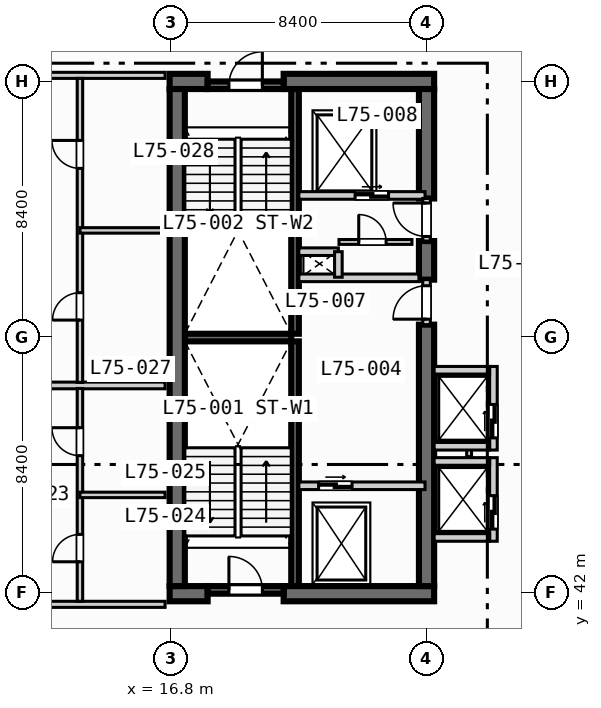
"""IFC4 building model, lengths in metres.
Left out: names, types, materials, properties, quantities, classifications, styles, units other than length and angle.
Written with IfcOpenShell. Run it as: python <this file> out.ifc"""

import sys

from ifc_helpers import new_model, si_unit, direction, frame, frame_2d, origin, place, context, subcontext, project, spatial, rectangle, extrude, element, fill, save


model = new_model("IFC4")
c1 = context("Model", 3, precision=1e-05, world=origin(), true_north=direction((0.0, 1.0)))
c2 = subcontext(c1, "Body", "Model", "MODEL_VIEW")
j1 = project(units=[si_unit("LENGTHUNIT", "METRE"), si_unit("PLANEANGLEUNIT", "RADIAN")], contexts=[c1])
p1 = place(None, origin())
s1 = spatial("IfcSite", under=j1, at=p1, CompositionType="ELEMENT")
p2 = place(p1, origin())
s2 = spatial("IfcBuilding", under=s1, at=p2, CompositionType="ELEMENT")
p3 = place(p2, frame((0.0, 0.0, 304.7)))
s3 = spatial("IfcBuildingStorey", under=s2, at=p3, CompositionType="ELEMENT", Elevation=304.7)
for number, where, z_axis, x_axis in (
    (1, (20.875, 42.2, 0.0), (0.0, 0.0, 1.0), (0.0, 1.0, 0.0)),
    (2, (20.875, 50.5, 0.0), (0.0, 0.0, 1.0), (0.0, 1.0, 0.0)),
):
    element("IfcWall", number, at=place(p3, frame(where, z_axis=z_axis, x_axis=x_axis)), inside=s3, PredefinedType="SOLIDWALL", context=c2, shape_type="SweptSolid", body=[
        extrude(rectangle(XDim=8.05, YDim=0.25, at=frame_2d((4.025, 0.0))), origin(), (0.0, 0.0, 1.0), 3.67),
    ])
p4 = place(p3, frame((17.25, 50.375, 0.0), z_axis=(0.0, 0.0, 1.0), x_axis=(1.0, 0.0, 0.0)))
e3 = element("IfcWall", 3, at=p4, inside=s3, PredefinedType="SOLIDWALL", context=c2, shape_type="SweptSolid", body=[
    extrude(rectangle(XDim=3.5, YDim=0.25, at=frame_2d((1.75, 0.0))), origin(), (0.0, 0.0, 1.0), 3.67),
])
p5 = place(p3, frame((16.75, 41.95, 0.0), z_axis=(0.0, 0.0, 1.0), x_axis=(1.0, 0.0, 0.0)))
e4 = element("IfcWall", 4, at=p5, inside=s3, PredefinedType="SHEAR", context=c2, shape_type="SweptSolid", body=[
    extrude(rectangle(XDim=1.25, YDim=0.5, at=frame_2d((0.625, 0.0))), origin(), (0.0, 0.0, 1.0), 3.67),
])
p6 = place(p3, frame((20.5, 41.95, 0.0), z_axis=(0.0, 0.0, 1.0), x_axis=(1.0, 0.0, 0.0)))
e5 = element("IfcWall", 5, at=p6, inside=s3, PredefinedType="SHEAR", context=c2, shape_type="SweptSolid", body=[
    extrude(rectangle(XDim=4.95, YDim=0.5, at=frame_2d((2.475, 0.0))), origin(), (0.0, 0.0, 1.0), 3.67),
])
p7 = place(p3, frame((16.75, 58.8, 0.0), z_axis=(0.0, 0.0, 1.0), x_axis=(1.0, 0.0, 0.0)))
e6 = element("IfcWall", 6, at=p7, inside=s3, PredefinedType="SHEAR", context=c2, shape_type="SweptSolid", body=[
    extrude(rectangle(XDim=1.25, YDim=0.5, at=frame_2d((0.625, 0.0))), origin(), (0.0, 0.0, 1.0), 3.67),
])
p8 = place(p3, frame((20.5, 58.8, 0.0), z_axis=(0.0, 0.0, 1.0), x_axis=(1.0, 0.0, 0.0)))
e7 = element("IfcWall", 7, at=p8, inside=s3, PredefinedType="SHEAR", context=c2, shape_type="SweptSolid", body=[
    extrude(rectangle(XDim=4.95, YDim=0.5, at=frame_2d((2.475, 0.0))), origin(), (0.0, 0.0, 1.0), 3.67),
])
p9 = place(p3, frame((17.0, 42.2, 0.0), z_axis=(0.0, 0.0, 1.0), x_axis=(0.0, 1.0, 0.0)))
e8 = element("IfcWall", 8, at=p9, inside=s3, PredefinedType="SHEAR", context=c2, shape_type="SweptSolid", body=[
    extrude(rectangle(XDim=16.35, YDim=0.5, at=frame_2d((8.175, 0.0))), origin(), (0.0, 0.0, 1.0), 3.67),
])
p10 = place(p3, frame((25.2, 42.2, 0.0), z_axis=(0.0, 0.0, 1.0), x_axis=(0.0, 1.0, 0.0)))
e9 = element("IfcWall", 9, at=p10, inside=s3, PredefinedType="SHEAR", context=c2, shape_type="SweptSolid", body=[
    extrude(rectangle(XDim=8.6, YDim=0.5, at=frame_2d((4.3, 0.0))), origin(), (0.0, 0.0, 1.0), 3.67),
])
p11 = place(p3, frame((25.2, 52.28, 0.0), z_axis=(0.0, 0.0, 1.0), x_axis=(0.0, 1.0, 0.0)))
e10 = element("IfcWall", 10, at=p11, inside=s3, PredefinedType="SHEAR", context=c2, shape_type="SweptSolid", body=[
    extrude(rectangle(XDim=1.27, YDim=0.5, at=frame_2d((0.635, 0.0))), origin(), (0.0, 0.0, 1.0), 3.67),
])
p12 = place(p3, frame((25.2, 54.95, 0.0), z_axis=(0.0, 0.0, 1.0), x_axis=(0.0, 1.0, 0.0)))
e11 = element("IfcWall", 11, at=p12, inside=s3, PredefinedType="SHEAR", context=c2, shape_type="SweptSolid", body=[
    extrude(rectangle(XDim=3.6, YDim=0.5, at=frame_2d((1.8, 0.0))), origin(), (0.0, 0.0, 1.0), 3.67),
])
p13 = place(p3, frame((18.0, 42.075, 0.0), z_axis=(0.0, 0.0, 1.0), x_axis=(1.0, 0.0, 0.0)))
e12 = element("IfcWall", 12, at=p13, inside=s3, PredefinedType="SOLIDWALL", context=c2, shape_type="SweptSolid", body=[
    extrude(rectangle(XDim=2.5, YDim=0.25, at=frame_2d((1.25, 0.0))), origin(), (0.0, 0.0, 1.0), 3.67),
])
p14 = place(p13, frame((0.7, 0.0, 0.0)))
e13 = element("IfcOpeningElement", 13, at=p14, cuts=e12, PredefinedType="OPENING", context=c2, shape_type="SweptSolid", body=[
    extrude(rectangle(XDim=1.1, YDim=2.15, at=frame_2d((0.55, 1.075))), frame((0.0, 0.135, 0.0), z_axis=(0.0, -1.0, 0.0), x_axis=(1.0, 0.0, 0.0)), (0.0, 0.0, 1.0), 0.27),
])
p15 = place(p3, frame((18.0, 58.675, 0.0), z_axis=(0.0, 0.0, 1.0), x_axis=(1.0, 0.0, 0.0)))
e14 = element("IfcWall", 14, at=p15, inside=s3, PredefinedType="SOLIDWALL", context=c2, shape_type="SweptSolid", body=[
    extrude(rectangle(XDim=2.5, YDim=0.25, at=frame_2d((1.25, 0.0))), origin(), (0.0, 0.0, 1.0), 3.67),
])
p16 = place(p15, frame((0.7, 0.0, 0.0)))
e15 = element("IfcOpeningElement", 15, at=p16, cuts=e14, PredefinedType="OPENING", context=c2, shape_type="SweptSolid", body=[
    extrude(rectangle(XDim=1.1, YDim=2.15, at=frame_2d((0.55, 1.075))), frame((0.0, 0.135, 0.0), z_axis=(0.0, -1.0, 0.0), x_axis=(1.0, 0.0, 0.0)), (0.0, 0.0, 1.0), 0.27),
])
p17 = place(p3, frame((21.0, 45.5, 0.0), z_axis=(0.0, 0.0, 1.0), x_axis=(1.0, 0.0, 0.0)))
e16 = element("IfcWall", 16, at=p17, inside=s3, PredefinedType="SOLIDWALL", context=c2, shape_type="SweptSolid", body=[
    extrude(rectangle(XDim=4.15, YDim=0.25, at=frame_2d((2.075, 0.0))), origin(), (0.0, 0.0, 1.0), 3.67),
])
p18 = place(p17, frame((0.65, 0.0, 0.0)))
e17 = element("IfcOpeningElement", 17, at=p18, cuts=e16, PredefinedType="OPENING", context=c2, shape_type="SweptSolid", body=[
    extrude(rectangle(XDim=1.1, YDim=2.15, at=frame_2d((0.55, 1.075))), frame((0.0, 0.135, 0.0), z_axis=(0.0, -1.0, 0.0), x_axis=(1.0, 0.0, 0.0)), (0.0, 0.0, 1.0), 0.27),
])
p19 = place(p3, frame((25.2, 50.8, 0.0), z_axis=(0.0, 0.0, 1.0), x_axis=(0.0, 1.0, 0.0)))
e18 = element("IfcWall", 18, at=p19, inside=s3, PredefinedType="SOLIDWALL", context=c2, shape_type="SweptSolid", body=[
    extrude(rectangle(XDim=1.48, YDim=0.25, at=frame_2d((0.74, 0.0))), origin(), (0.0, 0.0, 1.0), 3.67),
])
p20 = place(p19, frame((0.18, 0.0, 0.0)))
e19 = element("IfcOpeningElement", 19, at=p20, cuts=e18, PredefinedType="OPENING", context=c2, shape_type="SweptSolid", body=[
    extrude(rectangle(XDim=1.1, YDim=2.15, at=frame_2d((0.55, 1.075))), frame((0.0, 0.135, 0.0), z_axis=(0.0, -1.0, 0.0), x_axis=(1.0, 0.0, 0.0)), (0.0, 0.0, 1.0), 0.27),
])
p21 = place(p3, frame((21.0, 52.34, 0.0), z_axis=(0.0, 0.0, 1.0), x_axis=(1.0, 0.0, 0.0)))
e20 = element("IfcWall", 20, at=p21, inside=s3, PredefinedType="SOLIDWALL", context=c2, shape_type="SweptSolid", body=[
    extrude(rectangle(XDim=3.95, YDim=0.25, at=frame_2d((1.975, 0.0))), origin(), (0.0, 0.0, 1.0), 3.67),
])
p22 = place(p3, frame((21.0, 55.05, 0.0), z_axis=(0.0, 0.0, 1.0), x_axis=(1.0, 0.0, 0.0)))
e21 = element("IfcWall", 21, at=p22, inside=s3, PredefinedType="SOLIDWALL", context=c2, shape_type="SweptSolid", body=[
    extrude(rectangle(XDim=4.15, YDim=0.25, at=frame_2d((2.075, 0.0))), origin(), (0.0, 0.0, 1.0), 3.67),
])
p23 = place(p22, frame((1.85, 0.0, 0.0)))
e22 = element("IfcOpeningElement", 22, at=p23, cuts=e21, PredefinedType="OPENING", context=c2, shape_type="SweptSolid", body=[
    extrude(rectangle(XDim=1.1, YDim=2.15, at=frame_2d((0.55, 1.075))), frame((0.0, 0.135, 0.0), z_axis=(0.0, -1.0, 0.0), x_axis=(1.0, 0.0, 0.0)), (0.0, 0.0, 1.0), 0.27),
])
p24 = place(p3, frame((25.2, 53.55, 0.0), z_axis=(0.0, 0.0, 1.0), x_axis=(0.0, 1.0, 0.0)))
e23 = element("IfcWall", 23, at=p24, inside=s3, PredefinedType="SOLIDWALL", context=c2, shape_type="SweptSolid", body=[
    extrude(rectangle(XDim=1.4, YDim=0.25, at=frame_2d((0.7, 0.0))), origin(), (0.0, 0.0, 1.0), 3.67),
])
p25 = place(p24, frame((0.15, 0.0, 0.0)))
e24 = element("IfcOpeningElement", 24, at=p25, cuts=e23, PredefinedType="OPENING", context=c2, shape_type="SweptSolid", body=[
    extrude(rectangle(XDim=1.1, YDim=2.15, at=frame_2d((0.55, 1.075))), frame((0.0, 0.135, 0.0), z_axis=(0.0, -1.0, 0.0), x_axis=(1.0, 0.0, 0.0)), (0.0, 0.0, 1.0), 0.27),
])
p26 = place(p3, frame((21.0, 53.2, 0.0), z_axis=(0.0, 0.0, 1.0), x_axis=(1.0, 0.0, 0.0)))
e25 = element("IfcWall", 25, at=p26, inside=s3, PredefinedType="SOLIDWALL", context=c2, shape_type="SweptSolid", body=[
    extrude(rectangle(XDim=1.3, YDim=0.25, at=frame_2d((0.65, 0.0))), origin(), (0.0, 0.0, 1.0), 3.67),
])
p27 = place(p3, frame((22.3, 52.36, 0.0), z_axis=(0.0, 0.0, 1.0), x_axis=(0.0, 1.0, 0.0)))
e26 = element("IfcWall", 26, at=p27, inside=s3, PredefinedType="SOLIDWALL", context=c2, shape_type="SweptSolid", body=[
    extrude(rectangle(XDim=0.84, YDim=0.25, at=frame_2d((0.42, 0.0))), origin(), (0.0, 0.0, 1.0), 3.67),
])
p28 = place(p3, frame((22.32, 53.52, 0.0), z_axis=(0.0, 0.0, 1.0), x_axis=(1.0, 0.0, 0.0)))
e27 = element("IfcWall", 27, at=p28, inside=s3, PredefinedType="PARTITIONING", context=c2, shape_type="SweptSolid", body=[
    extrude(rectangle(XDim=2.4, YDim=0.16, at=frame_2d((1.2, 0.0))), origin(), (0.0, 0.0, 1.0), 3.67),
])
p29 = place(p28, frame((0.65, 0.0, 0.0)))
e28 = element("IfcOpeningElement", 28, at=p29, cuts=e27, PredefinedType="OPENING", context=c2, shape_type="SweptSolid", body=[
    extrude(rectangle(XDim=0.9, YDim=2.1, at=frame_2d((0.45, 1.05))), frame((0.0, 0.09, 0.0), z_axis=(0.0, -1.0, 0.0), x_axis=(1.0, 0.0, 0.0)), (0.0, 0.0, 1.0), 0.18),
])
p30 = place(p3, frame((27.4, 43.675, 0.0), z_axis=(0.0, 0.0, 1.0), x_axis=(0.0, 1.0, 0.0)))
e29 = element("IfcWall", 29, at=p30, inside=s3, PredefinedType="SOLIDWALL", context=c2, shape_type="SweptSolid", body=[
    extrude(rectangle(XDim=2.75, YDim=0.25, at=frame_2d((1.375, 0.0))), origin(), (0.0, 0.0, 1.0), 3.67),
])
p31 = place(p30, frame((0.4, 0.0, 0.0)))
e30 = element("IfcOpeningElement", 30, at=p31, cuts=e29, PredefinedType="OPENING", context=c2, shape_type="SweptSolid", body=[
    extrude(rectangle(XDim=1.1, YDim=2.15, at=frame_2d((0.55, 1.075))), frame((0.0, 0.135, 0.0), z_axis=(0.0, -1.0, 0.0), x_axis=(1.0, 0.0, 0.0)), (0.0, 0.0, 1.0), 0.27),
])
for number, where, z_axis, x_axis in (
    (31, (25.45, 43.8, 0.0), (0.0, 0.0, 1.0), (1.0, 0.0, 0.0)),
    (32, (25.45, 46.3, 0.0), (0.0, 0.0, 1.0), (1.0, 0.0, 0.0)),
):
    element("IfcWall", number, at=place(p3, frame(where, z_axis=z_axis, x_axis=x_axis)), inside=s3, PredefinedType="SOLIDWALL", context=c2, shape_type="SweptSolid", body=[
        extrude(rectangle(XDim=1.825, YDim=0.25, at=frame_2d((0.913, 0.0))), origin(), (0.0, 0.0, 1.0), 3.67),
    ])
p32 = place(p3, frame((26.6, 46.46, 0.0), z_axis=(0.0, 0.0, 1.0), x_axis=(0.0, 1.0, 0.0)))
e33 = element("IfcWall", 33, at=p32, inside=s3, PredefinedType="PARTITIONING", context=c2, shape_type="SweptSolid", body=[
    extrude(rectangle(XDim=0.88, YDim=0.16, at=frame_2d((0.44, 0.0))), origin(), (0.0, 0.0, 1.0), 3.67),
])
p33 = place(p3, frame((27.4, 46.675, 0.0), z_axis=(0.0, 0.0, 1.0), x_axis=(0.0, 1.0, 0.0)))
e34 = element("IfcWall", 34, at=p33, inside=s3, PredefinedType="SOLIDWALL", context=c2, shape_type="SweptSolid", body=[
    extrude(rectangle(XDim=2.75, YDim=0.25, at=frame_2d((1.375, 0.0))), origin(), (0.0, 0.0, 1.0), 3.67),
])
p34 = place(p33, frame((0.4, 0.0, 0.0)))
e35 = element("IfcOpeningElement", 35, at=p34, cuts=e34, PredefinedType="OPENING", context=c2, shape_type="SweptSolid", body=[
    extrude(rectangle(XDim=1.1, YDim=2.15, at=frame_2d((0.55, 1.075))), frame((0.0, 0.135, 0.0), z_axis=(0.0, -1.0, 0.0), x_axis=(1.0, 0.0, 0.0)), (0.0, 0.0, 1.0), 0.27),
])
for number, where, z_axis, x_axis in (
    (36, (25.45, 46.8, 0.0), (0.0, 0.0, 1.0), (1.0, 0.0, 0.0)),
    (37, (25.45, 49.3, 0.0), (0.0, 0.0, 1.0), (1.0, 0.0, 0.0)),
):
    element("IfcWall", number, at=place(p3, frame(where, z_axis=z_axis, x_axis=x_axis)), inside=s3, PredefinedType="SOLIDWALL", context=c2, shape_type="SweptSolid", body=[
        extrude(rectangle(XDim=1.825, YDim=0.25, at=frame_2d((0.913, 0.0))), origin(), (0.0, 0.0, 1.0), 3.67),
    ])
p35 = place(p3, frame((8.65, 41.6, 0.0), z_axis=(0.0, 0.0, 1.0), x_axis=(1.0, 0.0, 0.0)))
e38 = element("IfcWall", 38, at=p35, inside=s3, PredefinedType="PARTITIONING", context=c2, shape_type="SweptSolid", body=[
    extrude(rectangle(XDim=7.95, YDim=0.2, at=frame_2d((3.975, 0.0))), origin(), (0.0, 0.0, 1.0), 3.67),
])
p36 = place(p35, frame((2.0, 0.0, 0.0)))
e39 = element("IfcOpeningElement", 39, at=p36, cuts=e38, PredefinedType="OPENING", context=c2, shape_type="SweptSolid", body=[
    extrude(rectangle(XDim=1.0, YDim=2.15, at=frame_2d((0.5, 1.075))), frame((0.0, 0.11, 0.0), z_axis=(0.0, -1.0, 0.0), x_axis=(1.0, 0.0, 0.0)), (0.0, 0.0, 1.0), 0.22),
])
p37 = place(p3, frame((8.65, 59.0, 0.0), z_axis=(0.0, 0.0, 1.0), x_axis=(1.0, 0.0, 0.0)))
e40 = element("IfcWall", 40, at=p37, inside=s3, PredefinedType="PARTITIONING", context=c2, shape_type="SweptSolid", body=[
    extrude(rectangle(XDim=7.95, YDim=0.2, at=frame_2d((3.975, 0.0))), origin(), (0.0, 0.0, 1.0), 3.127),
])
p38 = place(p37, frame((2.0, 0.0, 0.0)))
e41 = element("IfcOpeningElement", 41, at=p38, cuts=e40, PredefinedType="OPENING", context=c2, shape_type="SweptSolid", body=[
    extrude(rectangle(XDim=1.0, YDim=2.15, at=frame_2d((0.5, 1.075))), frame((0.0, 0.11, 0.0), z_axis=(0.0, -1.0, 0.0), x_axis=(1.0, 0.0, 0.0)), (0.0, 0.0, 1.0), 0.22),
])
p39 = place(p3, frame((8.65, 48.8, 0.0), z_axis=(0.0, 0.0, 1.0), x_axis=(1.0, 0.0, 0.0)))
e42 = element("IfcWall", 42, at=p39, inside=s3, PredefinedType="PARTITIONING", context=c2, shape_type="SweptSolid", body=[
    extrude(rectangle(XDim=7.95, YDim=0.22, at=frame_2d((3.975, 0.0))), origin(), (0.0, 0.0, 1.0), 3.67),
])
p40 = place(p3, frame((13.8, 41.7, 0.0), z_axis=(0.0, 0.0, 1.0), x_axis=(0.0, 1.0, 0.0)))
e43 = element("IfcWall", 43, at=p40, inside=s3, PredefinedType="PLUMBINGWALL", context=c2, shape_type="SweptSolid", body=[
    extrude(rectangle(XDim=7.0, YDim=0.18, at=frame_2d((3.5, 0.0))), origin(), (0.0, 0.0, 1.0), 3.67),
])
p41 = place(p40, frame((1.3, 0.0, 0.0)))
e44 = element("IfcOpeningElement", 44, at=p41, cuts=e43, PredefinedType="OPENING", context=c2, shape_type="SweptSolid", body=[
    extrude(rectangle(XDim=0.9, YDim=2.1, at=frame_2d((0.45, 1.05))), frame((0.0, 0.1, 0.0), z_axis=(0.0, -1.0, 0.0), x_axis=(1.0, 0.0, 0.0)), (0.0, 0.0, 1.0), 0.2),
])
p42 = place(p40, frame((4.79, 0.0, 0.0)))
e45 = element("IfcOpeningElement", 45, at=p42, cuts=e43, PredefinedType="OPENING", context=c2, shape_type="SweptSolid", body=[
    extrude(rectangle(XDim=0.92, YDim=2.1, at=frame_2d((0.46, 1.05))), frame((0.0, 0.1, 0.0), z_axis=(0.0, -1.0, 0.0), x_axis=(1.0, 0.0, 0.0)), (0.0, 0.0, 1.0), 0.2),
])
p43 = place(p3, frame((13.8, 45.2, 0.0), z_axis=(0.0, 0.0, 1.0), x_axis=(1.0, 0.0, 0.0)))
e46 = element("IfcWall", 46, at=p43, inside=s3, PredefinedType="PLUMBINGWALL", context=c2, shape_type="SweptSolid", body=[
    extrude(rectangle(XDim=2.8, YDim=0.18, at=frame_2d((1.4, 0.0))), origin(), (0.0, 0.0, 1.0), 3.67),
])
p44 = place(p3, frame((13.8, 48.9, 0.0), z_axis=(0.0, 0.0, 1.0), x_axis=(0.0, 1.0, 0.0)))
e47 = element("IfcWall", 47, at=p44, inside=s3, PredefinedType="PLUMBINGWALL", context=c2, shape_type="SweptSolid", body=[
    extrude(rectangle(XDim=10.0, YDim=0.18, at=frame_2d((5.0, 0.0))), origin(), (0.0, 0.0, 1.0), 3.67),
])
p45 = place(p44, frame((2.05, 0.0, 0.0)))
e48 = element("IfcOpeningElement", 48, at=p45, cuts=e47, PredefinedType="OPENING", context=c2, shape_type="SweptSolid", body=[
    extrude(rectangle(XDim=0.9, YDim=2.1, at=frame_2d((0.45, 1.05))), frame((0.0, 0.1, 0.0), z_axis=(0.0, -1.0, 0.0), x_axis=(1.0, 0.0, 0.0)), (0.0, 0.0, 1.0), 0.2),
])
p46 = place(p44, frame((7.04, 0.0, 0.0)))
e49 = element("IfcOpeningElement", 49, at=p46, cuts=e47, PredefinedType="OPENING", context=c2, shape_type="SweptSolid", body=[
    extrude(rectangle(XDim=0.92, YDim=2.1, at=frame_2d((0.46, 1.05))), frame((0.0, 0.1, 0.0), z_axis=(0.0, -1.0, 0.0), x_axis=(1.0, 0.0, 0.0)), (0.0, 0.0, 1.0), 0.2),
])
p47 = place(p3, frame((13.8, 53.9, 0.0), z_axis=(0.0, 0.0, 1.0), x_axis=(1.0, 0.0, 0.0)))
e50 = element("IfcWall", 50, at=p47, inside=s3, PredefinedType="PLUMBINGWALL", context=c2, shape_type="SweptSolid", body=[
    extrude(rectangle(XDim=2.8, YDim=0.18, at=frame_2d((1.4, 0.0))), origin(), (0.0, 0.0, 1.0), 3.67),
])
p48 = place(p14, origin())
e51 = element("IfcDoor", 51, at=p48, inside=s3, OperationType="SINGLE_SWING_LEFT", PredefinedType="DOOR", context=c2, shape_type="SweptSolid", body=[
    extrude(rectangle(XDim=1.1, YDim=2.15, at=frame_2d((0.55, 1.075))), frame((0.0, 0.025, 0.0), z_axis=(0.0, -1.0, 0.0), x_axis=(1.0, 0.0, 0.0)), (0.0, 0.0, 1.0), 0.05),
])
fill(e13, e51)
p49 = place(p16, origin())
e52 = element("IfcDoor", 52, at=p49, inside=s3, OperationType="SINGLE_SWING_RIGHT", PredefinedType="DOOR", context=c2, shape_type="SweptSolid", body=[
    extrude(rectangle(XDim=1.1, YDim=2.15, at=frame_2d((0.55, 1.075))), frame((0.0, 0.025, 0.0), z_axis=(0.0, -1.0, 0.0), x_axis=(1.0, 0.0, 0.0)), (0.0, 0.0, 1.0), 0.05),
])
fill(e15, e52)
p50 = place(p18, origin())
e53 = element("IfcDoor", 53, at=p50, inside=s3, OperationType="SLIDING_TO_LEFT", PredefinedType="DOOR", context=c2, shape_type="SweptSolid", body=[
    extrude(rectangle(XDim=1.1, YDim=2.15, at=frame_2d((0.55, 1.075))), frame((0.0, 0.025, 0.0), z_axis=(0.0, -1.0, 0.0), x_axis=(1.0, 0.0, 0.0)), (0.0, 0.0, 1.0), 0.05),
])
fill(e17, e53)
p51 = place(p20, origin())
e54 = element("IfcDoor", 54, at=p51, inside=s3, OperationType="SINGLE_SWING_LEFT", PredefinedType="DOOR", context=c2, shape_type="SweptSolid", body=[
    extrude(rectangle(XDim=1.1, YDim=2.15, at=frame_2d((0.55, 1.075))), frame((0.0, 0.025, 0.0), z_axis=(0.0, -1.0, 0.0), x_axis=(1.0, 0.0, 0.0)), (0.0, 0.0, 1.0), 0.05),
])
fill(e19, e54)
p52 = place(p23, origin())
e55 = element("IfcDoor", 55, at=p52, inside=s3, OperationType="SLIDING_TO_LEFT", PredefinedType="DOOR", context=c2, shape_type="SweptSolid", body=[
    extrude(rectangle(XDim=1.1, YDim=2.15, at=frame_2d((0.55, 1.075))), frame((0.0, 0.025, 0.0), z_axis=(0.0, -1.0, 0.0), x_axis=(1.0, 0.0, 0.0)), (0.0, 0.0, 1.0), 0.05),
])
fill(e22, e55)
p53 = place(p25, origin())
e56 = element("IfcDoor", 56, at=p53, inside=s3, OperationType="SINGLE_SWING_RIGHT", PredefinedType="DOOR", context=c2, shape_type="SweptSolid", body=[
    extrude(rectangle(XDim=1.1, YDim=2.15, at=frame_2d((0.55, 1.075))), frame((0.0, 0.025, 0.0), z_axis=(0.0, -1.0, 0.0), x_axis=(1.0, 0.0, 0.0)), (0.0, 0.0, 1.0), 0.05),
])
fill(e24, e56)
p54 = place(p29, origin())
e57 = element("IfcDoor", 57, at=p54, inside=s3, OperationType="SINGLE_SWING_LEFT", PredefinedType="DOOR", context=c2, shape_type="SweptSolid", body=[
    extrude(rectangle(XDim=0.9, YDim=2.1, at=frame_2d((0.45, 1.05))), frame((0.0, 0.025, 0.0), z_axis=(0.0, -1.0, 0.0), x_axis=(1.0, 0.0, 0.0)), (0.0, 0.0, 1.0), 0.05),
])
fill(e28, e57)
p55 = place(p31, origin())
e58 = element("IfcDoor", 58, at=p55, inside=s3, OperationType="SLIDING_TO_LEFT", PredefinedType="DOOR", context=c2, shape_type="SweptSolid", body=[
    extrude(rectangle(XDim=1.1, YDim=2.15, at=frame_2d((0.55, 1.075))), frame((0.0, 0.025, 0.0), z_axis=(0.0, -1.0, 0.0), x_axis=(1.0, 0.0, 0.0)), (0.0, 0.0, 1.0), 0.05),
])
fill(e30, e58)
p56 = place(p34, origin())
e59 = element("IfcDoor", 59, at=p56, inside=s3, OperationType="SLIDING_TO_LEFT", PredefinedType="DOOR", context=c2, shape_type="SweptSolid", body=[
    extrude(rectangle(XDim=1.1, YDim=2.15, at=frame_2d((0.55, 1.075))), frame((0.0, 0.025, 0.0), z_axis=(0.0, -1.0, 0.0), x_axis=(1.0, 0.0, 0.0)), (0.0, 0.0, 1.0), 0.05),
])
fill(e35, e59)
p57 = place(p41, origin())
e60 = element("IfcDoor", 60, at=p57, inside=s3, OperationType="SINGLE_SWING_LEFT", PredefinedType="DOOR", context=c2, shape_type="SweptSolid", body=[
    extrude(rectangle(XDim=0.9, YDim=2.1, at=frame_2d((0.45, 1.05))), frame((0.0, 0.025, 0.0), z_axis=(0.0, -1.0, 0.0), x_axis=(1.0, 0.0, 0.0)), (0.0, 0.0, 1.0), 0.05),
])
fill(e44, e60)
p58 = place(p42, origin())
e61 = element("IfcDoor", 61, at=p58, inside=s3, OperationType="SINGLE_SWING_RIGHT", PredefinedType="DOOR", context=c2, shape_type="SweptSolid", body=[
    extrude(rectangle(XDim=0.92, YDim=2.1, at=frame_2d((0.46, 1.05))), frame((0.0, 0.025, 0.0), z_axis=(0.0, -1.0, 0.0), x_axis=(1.0, 0.0, 0.0)), (0.0, 0.0, 1.0), 0.05),
])
fill(e45, e61)
p59 = place(p45, origin())
e62 = element("IfcDoor", 62, at=p59, inside=s3, OperationType="SINGLE_SWING_LEFT", PredefinedType="DOOR", context=c2, shape_type="SweptSolid", body=[
    extrude(rectangle(XDim=0.9, YDim=2.1, at=frame_2d((0.45, 1.05))), frame((0.0, 0.025, 0.0), z_axis=(0.0, -1.0, 0.0), x_axis=(1.0, 0.0, 0.0)), (0.0, 0.0, 1.0), 0.05),
])
fill(e48, e62)
p60 = place(p46, origin())
e63 = element("IfcDoor", 63, at=p60, inside=s3, OperationType="SINGLE_SWING_RIGHT", PredefinedType="DOOR", context=c2, shape_type="SweptSolid", body=[
    extrude(rectangle(XDim=0.92, YDim=2.1, at=frame_2d((0.46, 1.05))), frame((0.0, 0.025, 0.0), z_axis=(0.0, -1.0, 0.0), x_axis=(1.0, 0.0, 0.0)), (0.0, 0.0, 1.0), 0.05),
])
fill(e49, e63)
save(model, sys.argv[1])
